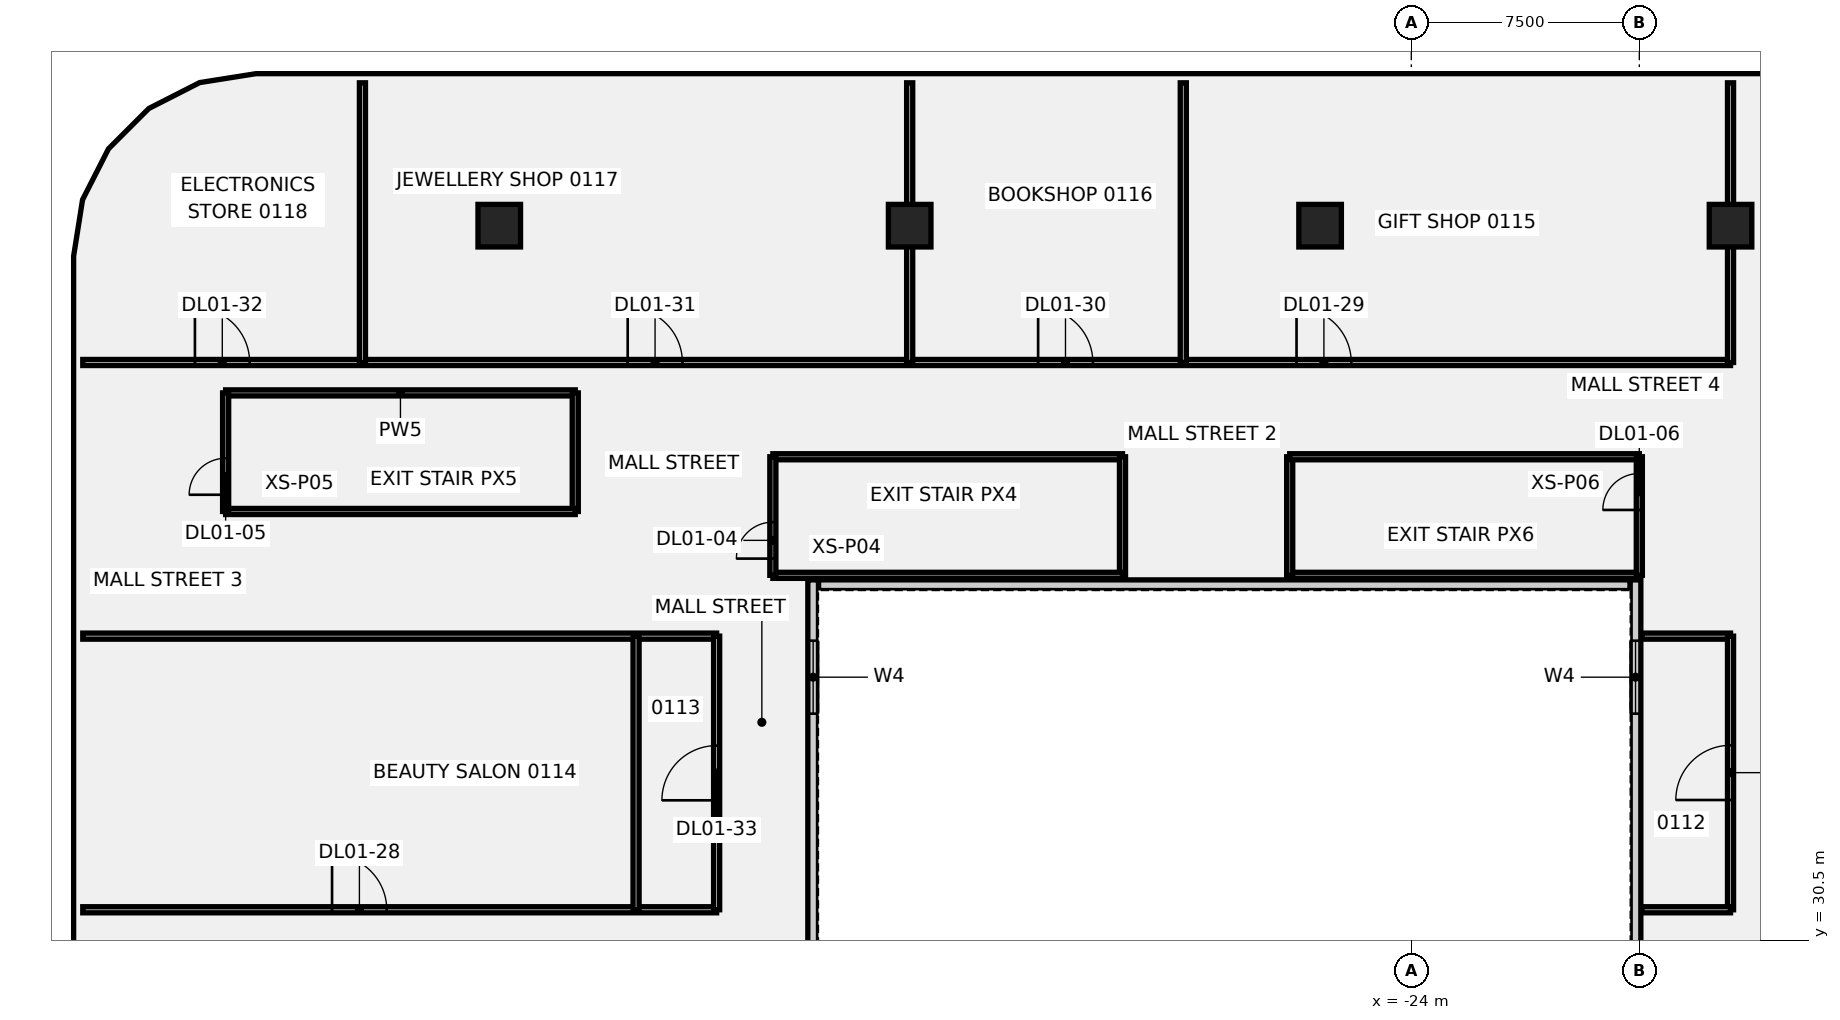
"""IFC4 building model, lengths in metres.
Left out: names, types, materials, properties, quantities, classifications, styles, units other than length and angle.
Written with IfcOpenShell. Run it as: python <this file> out.ifc"""

import sys

from ifc_helpers import new_model, si_unit, direction, frame, frame_2d, origin, origin_2d, place, context, subcontext, project, spatial, rectangle, extrude, element, fill, save


model = new_model("IFC4")
c1 = context("Model", 3, precision=1e-05, world=origin(), true_north=direction((0.0, 1.0)))
c2 = subcontext(c1, "Body", "Model", "MODEL_VIEW")
j1 = project(units=[si_unit("LENGTHUNIT", "METRE"), si_unit("PLANEANGLEUNIT", "RADIAN")], contexts=[c1])
p1 = place(None, origin())
s1 = spatial("IfcSite", under=j1, at=p1, CompositionType="ELEMENT")
p2 = place(p1, origin())
s2 = spatial("IfcBuilding", under=s1, at=p2, CompositionType="ELEMENT")
p3 = place(p2, frame((0.0, 0.0, 9.0)))
s3 = spatial("IfcBuildingStorey", under=s2, at=p3, CompositionType="ELEMENT", Elevation=9.0)
for number, where, z_axis, x_axis in (
    (1, (-54.0, 54.0, -0.5), (0.0, 0.0, 1.0), (1.0, 0.0, 0.0)),
    (2, (-40.5, 54.0, -0.5), (0.0, 0.0, 1.0), (1.0, 0.0, 0.0)),
    (3, (-27.0, 54.0, -0.5), (0.0, 0.0, 1.0), (1.0, 0.0, 0.0)),
    (4, (-13.5, 54.0, -0.5), (0.0, 0.0, 1.0), (1.0, 0.0, 0.0)),
):
    element("IfcColumn", number, at=place(p3, frame(where, z_axis=z_axis, x_axis=x_axis)), inside=s3, PredefinedType="COLUMN", context=c2, shape_type="SweptSolid", body=[
        extrude(rectangle(XDim=1.4, YDim=1.4, at=origin_2d()), origin(), (0.0, 0.0, 1.0), 6.0),
    ])
p4 = place(p3, frame((-63.0, 48.5, 0.0), z_axis=(0.0, 0.0, 1.0), x_axis=(1.0, 0.0, 0.0)))
e5 = element("IfcWall", 5, at=p4, inside=s3, PredefinedType="PARTITIONING", context=c2, shape_type="SweptSolid", body=[
    extrude(rectangle(XDim=11.5, YDim=0.2, at=frame_2d((5.75, 0.0))), origin(), (0.0, 0.0, 1.0), 5.5),
])
p5 = place(p3, frame((-51.5, 44.6, 0.0), z_axis=(0.0, 0.0, 1.0), x_axis=(0.0, 1.0, 0.0)))
e6 = element("IfcWall", 6, at=p5, inside=s3, PredefinedType="PARTITIONING", context=c2, shape_type="SweptSolid", body=[
    extrude(rectangle(XDim=3.9, YDim=0.2, at=frame_2d((1.95, 0.0))), origin(), (0.0, 0.0, 1.0), 5.5),
])
p6 = place(p3, frame((-63.0, 44.6, 0.0), z_axis=(0.0, 0.0, 1.0), x_axis=(1.0, 0.0, 0.0)))
e7 = element("IfcWall", 7, at=p6, inside=s3, PredefinedType="PARTITIONING", context=c2, shape_type="SweptSolid", body=[
    extrude(rectangle(XDim=11.5, YDim=0.2, at=frame_2d((5.75, 0.0))), origin(), (0.0, 0.0, 1.0), 5.5),
])
p7 = place(p3, frame((-63.0, 44.6, 0.0), z_axis=(0.0, 0.0, 1.0), x_axis=(0.0, 1.0, 0.0)))
e8 = element("IfcWall", 8, at=p7, inside=s3, PredefinedType="PARTITIONING", context=c2, shape_type="SweptSolid", body=[
    extrude(rectangle(XDim=3.9, YDim=0.2, at=frame_2d((1.95, 0.0))), origin(), (0.0, 0.0, 1.0), 5.5),
])
p8 = place(p7, frame((0.55, 0.0, 0.0)))
e9 = element("IfcOpeningElement", 9, at=p8, cuts=e8, PredefinedType="OPENING", context=c2, shape_type="SweptSolid", body=[
    extrude(rectangle(XDim=1.2, YDim=2.1, at=frame_2d((0.6, 1.05))), frame((0.0, 0.11, 0.0), z_axis=(0.0, -1.0, 0.0), x_axis=(1.0, 0.0, 0.0)), (0.0, 0.0, 1.0), 0.22),
])
p9 = place(p3, frame((-45.0, 46.4, 0.0), z_axis=(0.0, 0.0, 1.0), x_axis=(1.0, 0.0, 0.0)))
e10 = element("IfcWall", 10, at=p9, inside=s3, PredefinedType="PARTITIONING", context=c2, shape_type="SweptSolid", body=[
    extrude(rectangle(XDim=11.5, YDim=0.2, at=frame_2d((5.75, 0.0))), origin(), (0.0, 0.0, 1.0), 5.5),
])
p10 = place(p3, frame((-33.5, 42.5, 0.0), z_axis=(0.0, 0.0, 1.0), x_axis=(0.0, 1.0, 0.0)))
e11 = element("IfcWall", 11, at=p10, inside=s3, PredefinedType="PARTITIONING", context=c2, shape_type="SweptSolid", body=[
    extrude(rectangle(XDim=3.9, YDim=0.2, at=frame_2d((1.95, 0.0))), origin(), (0.0, 0.0, 1.0), 5.5),
])
p11 = place(p3, frame((-45.0, 42.5, 0.0), z_axis=(0.0, 0.0, 1.0), x_axis=(1.0, 0.0, 0.0)))
e12 = element("IfcWall", 12, at=p11, inside=s3, PredefinedType="PARTITIONING", context=c2, shape_type="SweptSolid", body=[
    extrude(rectangle(XDim=11.5, YDim=0.2, at=frame_2d((5.75, 0.0))), origin(), (0.0, 0.0, 1.0), 5.5),
])
p12 = place(p3, frame((-45.0, 42.5, 0.0), z_axis=(0.0, 0.0, 1.0), x_axis=(0.0, 1.0, 0.0)))
e13 = element("IfcWall", 13, at=p12, inside=s3, PredefinedType="PARTITIONING", context=c2, shape_type="SweptSolid", body=[
    extrude(rectangle(XDim=3.9, YDim=0.2, at=frame_2d((1.95, 0.0))), origin(), (0.0, 0.0, 1.0), 5.5),
])
p13 = place(p12, frame((0.55, 0.0, 0.0)))
e14 = element("IfcOpeningElement", 14, at=p13, cuts=e13, PredefinedType="OPENING", context=c2, shape_type="SweptSolid", body=[
    extrude(rectangle(XDim=1.2, YDim=2.1, at=frame_2d((0.6, 1.05))), frame((0.0, 0.11, 0.0), z_axis=(0.0, -1.0, 0.0), x_axis=(1.0, 0.0, 0.0)), (0.0, 0.0, 1.0), 0.22),
])
p14 = place(p3, frame((-28.0, 42.5, 0.0), z_axis=(0.0, 0.0, 1.0), x_axis=(1.0, 0.0, 0.0)))
e15 = element("IfcWall", 15, at=p14, inside=s3, PredefinedType="PARTITIONING", context=c2, shape_type="SweptSolid", body=[
    extrude(rectangle(XDim=11.5, YDim=0.2, at=frame_2d((5.75, 0.0))), origin(), (0.0, 0.0, 1.0), 5.5),
])
p15 = place(p3, frame((-28.0, 42.5, 0.0), z_axis=(0.0, 0.0, 1.0), x_axis=(0.0, 1.0, 0.0)))
e16 = element("IfcWall", 16, at=p15, inside=s3, PredefinedType="PARTITIONING", context=c2, shape_type="SweptSolid", body=[
    extrude(rectangle(XDim=3.9, YDim=0.2, at=frame_2d((1.95, 0.0))), origin(), (0.0, 0.0, 1.0), 5.5),
])
p16 = place(p3, frame((-28.0, 46.4, 0.0), z_axis=(0.0, 0.0, 1.0), x_axis=(1.0, 0.0, 0.0)))
e17 = element("IfcWall", 17, at=p16, inside=s3, PredefinedType="PARTITIONING", context=c2, shape_type="SweptSolid", body=[
    extrude(rectangle(XDim=11.5, YDim=0.2, at=frame_2d((5.75, 0.0))), origin(), (0.0, 0.0, 1.0), 5.5),
])
p17 = place(p3, frame((-16.5, 42.5, 0.0), z_axis=(0.0, 0.0, 1.0), x_axis=(0.0, 1.0, 0.0)))
e18 = element("IfcWall", 18, at=p17, inside=s3, PredefinedType="PARTITIONING", context=c2, shape_type="SweptSolid", body=[
    extrude(rectangle(XDim=3.9, YDim=0.2, at=frame_2d((1.95, 0.0))), origin(), (0.0, 0.0, 1.0), 5.5),
])
p18 = place(p17, frame((2.15, 0.0, 0.0)))
e19 = element("IfcOpeningElement", 19, at=p18, cuts=e18, PredefinedType="OPENING", context=c2, shape_type="SweptSolid", body=[
    extrude(rectangle(XDim=1.2, YDim=2.1, at=frame_2d((0.6, 1.05))), frame((0.0, 0.11, 0.0), z_axis=(0.0, -1.0, 0.0), x_axis=(1.0, 0.0, 0.0)), (0.0, 0.0, 1.0), 0.22),
])
p19 = place(p3, frame((-67.699, 31.5, 0.0), z_axis=(0.0, 0.0, 1.0), x_axis=(1.0, 0.0, 0.0)))
e20 = element("IfcWall", 20, at=p19, inside=s3, PredefinedType="PARTITIONING", context=c2, shape_type="SweptSolid", body=[
    extrude(rectangle(XDim=20.849, YDim=0.2, at=frame_2d((10.424, 0.0))), origin(), (0.0, 0.0, 1.0), 5.5),
])
p20 = place(p19, frame((8.199, 0.0, 0.0)))
e21 = element("IfcOpeningElement", 21, at=p20, cuts=e20, PredefinedType="OPENING", context=c2, shape_type="SweptSolid", body=[
    extrude(rectangle(XDim=1.8, YDim=2.1, at=frame_2d((0.9, 1.05))), frame((0.0, 0.11, 0.0), z_axis=(0.0, -1.0, 0.0), x_axis=(1.0, 0.0, 0.0)), (0.0, 0.0, 1.0), 0.22),
])
p21 = place(p3, frame((-67.699, 40.5, 0.0), z_axis=(0.0, 0.0, 1.0), x_axis=(1.0, 0.0, 0.0)))
e22 = element("IfcWall", 22, at=p21, inside=s3, PredefinedType="PARTITIONING", context=c2, shape_type="SweptSolid", body=[
    extrude(rectangle(XDim=20.849, YDim=0.2, at=frame_2d((10.424, 0.0))), origin(), (0.0, 0.0, 1.0), 5.5),
])
p22 = place(p3, frame((-67.699, 49.5, 0.0), z_axis=(0.0, 0.0, 1.0), x_axis=(1.0, 0.0, 0.0)))
e23 = element("IfcWall", 23, at=p22, inside=s3, PredefinedType="PARTITIONING", context=c2, shape_type="SweptSolid", body=[
    extrude(rectangle(XDim=54.199, YDim=0.2, at=frame_2d((27.1, 0.0))), origin(), (0.0, 0.0, 1.0), 5.5),
])
p23 = place(p22, frame((39.924, 0.0, 0.0)))
e24 = element("IfcOpeningElement", 24, at=p23, cuts=e23, PredefinedType="OPENING", context=c2, shape_type="SweptSolid", body=[
    extrude(rectangle(XDim=1.8, YDim=2.1, at=frame_2d((0.9, 1.05))), frame((0.0, 0.11, 0.0), z_axis=(0.0, -1.0, 0.0), x_axis=(1.0, 0.0, 0.0)), (0.0, 0.0, 1.0), 0.22),
])
p24 = place(p22, frame((31.424, 0.0, 0.0)))
e25 = element("IfcOpeningElement", 25, at=p24, cuts=e23, PredefinedType="OPENING", context=c2, shape_type="SweptSolid", body=[
    extrude(rectangle(XDim=1.8, YDim=2.1, at=frame_2d((0.9, 1.05))), frame((0.0, 0.11, 0.0), z_axis=(0.0, -1.0, 0.0), x_axis=(1.0, 0.0, 0.0)), (0.0, 0.0, 1.0), 0.22),
])
p25 = place(p22, frame((17.924, 0.0, 0.0)))
e26 = element("IfcOpeningElement", 26, at=p25, cuts=e23, PredefinedType="OPENING", context=c2, shape_type="SweptSolid", body=[
    extrude(rectangle(XDim=1.8, YDim=2.1, at=frame_2d((0.9, 1.05))), frame((0.0, 0.11, 0.0), z_axis=(0.0, -1.0, 0.0), x_axis=(1.0, 0.0, 0.0)), (0.0, 0.0, 1.0), 0.22),
])
p26 = place(p22, frame((3.689, 0.0, 0.0)))
e27 = element("IfcOpeningElement", 27, at=p26, cuts=e23, PredefinedType="OPENING", context=c2, shape_type="SweptSolid", body=[
    extrude(rectangle(XDim=1.8, YDim=2.1, at=frame_2d((0.9, 1.05))), frame((0.0, 0.11, 0.0), z_axis=(0.0, -1.0, 0.0), x_axis=(1.0, 0.0, 0.0)), (0.0, 0.0, 1.0), 0.22),
])
p27 = place(p3, frame((-58.5, 49.5, 0.0), z_axis=(0.0, 0.0, 1.0), x_axis=(0.0, 1.0, 0.0)))
e28 = element("IfcWall", 28, at=p27, inside=s3, PredefinedType="PARTITIONING", context=c2, shape_type="SweptSolid", body=[
    extrude(rectangle(XDim=9.199, YDim=0.2, at=frame_2d((4.6, 0.0))), origin(), (0.0, 0.0, 1.0), 5.5),
])
p28 = place(p3, frame((-46.85, 31.5, 0.0), z_axis=(0.0, 0.0, 1.0), x_axis=(0.0, 1.0, 0.0)))
e29 = element("IfcWall", 29, at=p28, inside=s3, PredefinedType="PARTITIONING", context=c2, shape_type="SweptSolid", body=[
    extrude(rectangle(XDim=9.0, YDim=0.2, at=frame_2d((4.5, 0.0))), origin(), (0.0, 0.0, 1.0), 5.5),
])
p29 = place(p28, frame((3.6, 0.0, 0.0)))
e30 = element("IfcOpeningElement", 30, at=p29, cuts=e29, PredefinedType="OPENING", context=c2, shape_type="SweptSolid", body=[
    extrude(rectangle(XDim=1.8, YDim=2.1, at=frame_2d((0.9, 1.05))), frame((0.0, 0.11, 0.0), z_axis=(0.0, -1.0, 0.0), x_axis=(1.0, 0.0, 0.0)), (0.0, 0.0, 1.0), 0.22),
])
p30 = place(p3, frame((-49.5, 31.5, 0.0), z_axis=(0.0, 0.0, 1.0), x_axis=(0.0, 1.0, 0.0)))
e31 = element("IfcWall", 31, at=p30, inside=s3, PredefinedType="PARTITIONING", context=c2, shape_type="SweptSolid", body=[
    extrude(rectangle(XDim=9.0, YDim=0.2, at=frame_2d((4.5, 0.0))), origin(), (0.0, 0.0, 1.0), 5.5),
])
for number, where, z_axis, x_axis in (
    (32, (-40.5, 49.5, 0.0), (0.0, 0.0, 1.0), (0.0, 1.0, 0.0)),
    (33, (-13.5, 49.5, 0.0), (0.0, 0.0, 1.0), (0.0, 1.0, 0.0)),
    (34, (-31.5, 49.5, 0.0), (0.0, 0.0, 1.0), (0.0, 1.0, 0.0)),
):
    element("IfcWall", number, at=place(p3, frame(where, z_axis=z_axis, x_axis=x_axis)), inside=s3, PredefinedType="PARTITIONING", context=c2, shape_type="SweptSolid", body=[
        extrude(rectangle(XDim=9.199, YDim=0.2, at=frame_2d((4.6, 0.0))), origin(), (0.0, 0.0, 1.0), 5.5),
    ])
p31 = place(p3, frame((-16.42, 40.5, 0.0), z_axis=(0.0, 0.0, 1.0), x_axis=(1.0, 0.0, 0.0)))
e35 = element("IfcWall", 35, at=p31, inside=s3, PredefinedType="PARTITIONING", context=c2, shape_type="SweptSolid", body=[
    extrude(rectangle(XDim=2.92, YDim=0.2, at=frame_2d((1.46, 0.0))), origin(), (0.0, 0.0, 1.0), 5.5),
])
p32 = place(p3, frame((-13.5, 31.5, 0.0), z_axis=(0.0, 0.0, 1.0), x_axis=(0.0, 1.0, 0.0)))
e36 = element("IfcWall", 36, at=p32, inside=s3, PredefinedType="PARTITIONING", context=c2, shape_type="SweptSolid", body=[
    extrude(rectangle(XDim=9.0, YDim=0.2, at=frame_2d((4.5, 0.0))), origin(), (0.0, 0.0, 1.0), 5.5),
])
p33 = place(p32, frame((3.61, 0.0, 0.0)))
e37 = element("IfcOpeningElement", 37, at=p33, cuts=e36, PredefinedType="OPENING", context=c2, shape_type="SweptSolid", body=[
    extrude(rectangle(XDim=1.8, YDim=2.1, at=frame_2d((0.9, 1.05))), frame((0.0, 0.11, 0.0), z_axis=(0.0, -1.0, 0.0), x_axis=(1.0, 0.0, 0.0)), (0.0, 0.0, 1.0), 0.22),
])
p34 = place(p3, frame((-16.42, 31.5, 0.0), z_axis=(0.0, 0.0, 1.0), x_axis=(1.0, 0.0, 0.0)))
e38 = element("IfcWall", 38, at=p34, inside=s3, PredefinedType="PARTITIONING", context=c2, shape_type="SweptSolid", body=[
    extrude(rectangle(XDim=2.92, YDim=0.2, at=frame_2d((1.46, 0.0))), origin(), (0.0, 0.0, 1.0), 5.5),
])
p35 = place(p3, frame((-43.5, 42.175, 0.0), z_axis=(0.0, 0.0, 1.0), x_axis=(1.0, 0.0, 0.0)))
e39 = element("IfcWall", 39, at=p35, inside=s3, PredefinedType="SOLIDWALL", context=c2, shape_type="SweptSolid", body=[
    extrude(rectangle(XDim=26.7, YDim=0.35, at=frame_2d((13.35, 0.0))), origin(), (0.0, 0.0, 1.0), 5.5),
])
p36 = place(p3, frame((-43.675, 23.65, 0.0), z_axis=(0.0, 0.0, 1.0), x_axis=(0.0, 1.0, 0.0)))
e40 = element("IfcWall", 40, at=p36, inside=s3, PredefinedType="SOLIDWALL", context=c2, shape_type="SweptSolid", body=[
    extrude(rectangle(XDim=18.7, YDim=0.35, at=frame_2d((9.35, 0.0))), origin(), (0.0, 0.0, 1.0), 5.5),
])
p37 = place(p36, frame((14.3, 0.0, 1.0)))
e41 = element("IfcOpeningElement", 41, at=p37, cuts=e40, PredefinedType="OPENING", context=c2, shape_type="SweptSolid", body=[
    extrude(rectangle(XDim=2.4, YDim=1.8, at=frame_2d((1.2, 0.9))), frame((0.0, 0.185, 0.0), z_axis=(0.0, -1.0, 0.0), x_axis=(1.0, 0.0, 0.0)), (0.0, 0.0, 1.0), 0.37),
])
p38 = place(p3, frame((-16.625, 23.65, 0.0), z_axis=(0.0, 0.0, 1.0), x_axis=(0.0, 1.0, 0.0)))
e42 = element("IfcWall", 42, at=p38, inside=s3, PredefinedType="SOLIDWALL", context=c2, shape_type="SweptSolid", body=[
    extrude(rectangle(XDim=18.7, YDim=0.35, at=frame_2d((9.35, 0.0))), origin(), (0.0, 0.0, 1.0), 5.5),
])
p39 = place(p38, frame((14.3, 0.0, 1.0)))
e43 = element("IfcOpeningElement", 43, at=p39, cuts=e42, PredefinedType="OPENING", context=c2, shape_type="SweptSolid", body=[
    extrude(rectangle(XDim=2.4, YDim=1.8, at=frame_2d((1.2, 0.9))), frame((0.0, 0.185, 0.0), z_axis=(0.0, -1.0, 0.0), x_axis=(1.0, 0.0, 0.0)), (0.0, 0.0, 1.0), 0.37),
])
p40 = place(p13, origin())
e44 = element("IfcDoor", 44, at=p40, inside=s3, OperationType="SINGLE_SWING_RIGHT", PredefinedType="DOOR", context=c2, shape_type="SweptSolid", body=[
    extrude(rectangle(XDim=1.2, YDim=2.1, at=frame_2d((0.6, 1.05))), frame((0.0, 0.025, 0.0), z_axis=(0.0, -1.0, 0.0), x_axis=(1.0, 0.0, 0.0)), (0.0, 0.0, 1.0), 0.05),
])
fill(e14, e44)
p41 = place(p8, origin())
e45 = element("IfcDoor", 45, at=p41, inside=s3, OperationType="SINGLE_SWING_LEFT", PredefinedType="DOOR", context=c2, shape_type="SweptSolid", body=[
    extrude(rectangle(XDim=1.2, YDim=2.1, at=frame_2d((0.6, 1.05))), frame((0.0, 0.025, 0.0), z_axis=(0.0, -1.0, 0.0), x_axis=(1.0, 0.0, 0.0)), (0.0, 0.0, 1.0), 0.05),
])
fill(e9, e45)
p42 = place(p18, origin())
e46 = element("IfcDoor", 46, at=p42, inside=s3, OperationType="SINGLE_SWING_RIGHT", PredefinedType="DOOR", context=c2, shape_type="SweptSolid", body=[
    extrude(rectangle(XDim=1.2, YDim=2.1, at=frame_2d((0.6, 1.05))), frame((0.0, 0.025, 0.0), z_axis=(0.0, -1.0, 0.0), x_axis=(1.0, 0.0, 0.0)), (0.0, 0.0, 1.0), 0.05),
])
fill(e19, e46)
p43 = place(p33, origin())
e47 = element("IfcDoor", 47, at=p43, inside=s3, OperationType="SINGLE_SWING_LEFT", PredefinedType="DOOR", context=c2, shape_type="SweptSolid", body=[
    extrude(rectangle(XDim=1.8, YDim=2.1, at=frame_2d((0.9, 1.05))), frame((0.0, 0.025, 0.0), z_axis=(0.0, -1.0, 0.0), x_axis=(1.0, 0.0, 0.0)), (0.0, 0.0, 1.0), 0.05),
])
fill(e37, e47)
p44 = place(p20, origin())
e48 = element("IfcDoor", 48, at=p44, inside=s3, OperationType="SINGLE_SWING_RIGHT", PredefinedType="DOOR", context=c2, shape_type="SweptSolid", body=[
    extrude(rectangle(XDim=1.8, YDim=2.1, at=frame_2d((0.9, 1.05))), frame((0.0, 0.025, 0.0), z_axis=(0.0, -1.0, 0.0), x_axis=(1.0, 0.0, 0.0)), (0.0, 0.0, 1.0), 0.05),
])
fill(e21, e48)
p45 = place(p23, origin())
e49 = element("IfcDoor", 49, at=p45, inside=s3, OperationType="SINGLE_SWING_LEFT", PredefinedType="DOOR", context=c2, shape_type="SweptSolid", body=[
    extrude(rectangle(XDim=1.8, YDim=2.1, at=frame_2d((0.9, 1.05))), frame((0.0, 0.025, 0.0), z_axis=(0.0, -1.0, 0.0), x_axis=(1.0, 0.0, 0.0)), (0.0, 0.0, 1.0), 0.05),
])
fill(e24, e49)
p46 = place(p24, origin())
e50 = element("IfcDoor", 50, at=p46, inside=s3, OperationType="SINGLE_SWING_RIGHT", PredefinedType="DOOR", context=c2, shape_type="SweptSolid", body=[
    extrude(rectangle(XDim=1.8, YDim=2.1, at=frame_2d((0.9, 1.05))), frame((0.0, 0.025, 0.0), z_axis=(0.0, -1.0, 0.0), x_axis=(1.0, 0.0, 0.0)), (0.0, 0.0, 1.0), 0.05),
])
fill(e25, e50)
p47 = place(p25, origin())
e51 = element("IfcDoor", 51, at=p47, inside=s3, OperationType="SINGLE_SWING_LEFT", PredefinedType="DOOR", context=c2, shape_type="SweptSolid", body=[
    extrude(rectangle(XDim=1.8, YDim=2.1, at=frame_2d((0.9, 1.05))), frame((0.0, 0.025, 0.0), z_axis=(0.0, -1.0, 0.0), x_axis=(1.0, 0.0, 0.0)), (0.0, 0.0, 1.0), 0.05),
])
fill(e26, e51)
p48 = place(p26, origin())
e52 = element("IfcDoor", 52, at=p48, inside=s3, OperationType="SINGLE_SWING_RIGHT", PredefinedType="DOOR", context=c2, shape_type="SweptSolid", body=[
    extrude(rectangle(XDim=1.8, YDim=2.1, at=frame_2d((0.9, 1.05))), frame((0.0, 0.025, 0.0), z_axis=(0.0, -1.0, 0.0), x_axis=(1.0, 0.0, 0.0)), (0.0, 0.0, 1.0), 0.05),
])
fill(e27, e52)
p49 = place(p29, origin())
e53 = element("IfcDoor", 53, at=p49, inside=s3, OperationType="SINGLE_SWING_LEFT", PredefinedType="DOOR", context=c2, shape_type="SweptSolid", body=[
    extrude(rectangle(XDim=1.8, YDim=2.1, at=frame_2d((0.9, 1.05))), frame((0.0, 0.025, 0.0), z_axis=(0.0, -1.0, 0.0), x_axis=(1.0, 0.0, 0.0)), (0.0, 0.0, 1.0), 0.05),
])
fill(e30, e53)
p50 = place(p37, origin())
e54 = element("IfcWindow", 54, at=p50, inside=s3, PartitioningType="SINGLE_PANEL", PredefinedType="WINDOW", context=c2, shape_type="SweptSolid", body=[
    extrude(rectangle(XDim=2.4, YDim=1.8, at=frame_2d((1.2, 0.9))), frame((0.0, 0.03, 0.0), z_axis=(0.0, -1.0, 0.0), x_axis=(1.0, 0.0, 0.0)), (0.0, 0.0, 1.0), 0.06),
])
fill(e41, e54)
p51 = place(p39, origin())
e55 = element("IfcWindow", 55, at=p51, inside=s3, PartitioningType="SINGLE_PANEL", PredefinedType="WINDOW", context=c2, shape_type="SweptSolid", body=[
    extrude(rectangle(XDim=2.4, YDim=1.8, at=frame_2d((1.2, 0.9))), frame((0.0, 0.03, 0.0), z_axis=(0.0, -1.0, 0.0), x_axis=(1.0, 0.0, 0.0)), (0.0, 0.0, 1.0), 0.06),
])
fill(e43, e55)
save(model, sys.argv[1])
